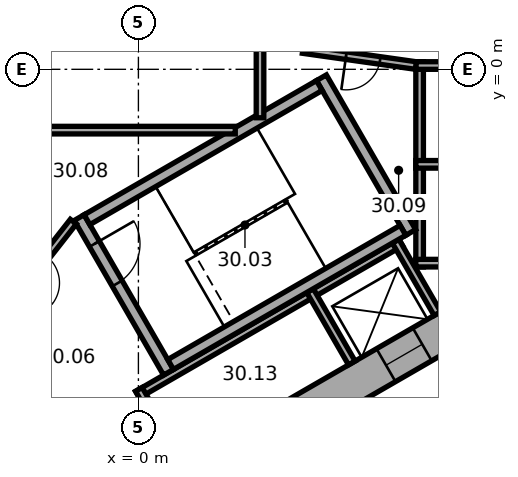
"""IFC4 building model, lengths in metres.
Left out: names, types, materials, properties, quantities, classifications, styles, units other than length and angle.
Written with IfcOpenShell. Run it as: python <this file> out.ifc"""

import sys

from ifc_helpers import new_model, si_unit, direction, frame, frame_2d, origin, place, context, subcontext, project, spatial, rectangle, extrude, element, fill, save


model = new_model("IFC4")
c1 = context("Model", 3, precision=1e-05, world=origin(), true_north=direction((0.0, 1.0)))
c2 = subcontext(c1, "Body", "Model", "MODEL_VIEW")
j1 = project(units=[si_unit("LENGTHUNIT", "METRE"), si_unit("PLANEANGLEUNIT", "RADIAN")], contexts=[c1])
p1 = place(None, origin())
s1 = spatial("IfcSite", under=j1, at=p1, CompositionType="ELEMENT")
p2 = place(p1, origin())
s2 = spatial("IfcBuilding", under=s1, at=p2, CompositionType="ELEMENT")
p3 = place(p2, frame((0.0, 0.0, 124.4)))
s3 = spatial("IfcBuildingStorey", under=s2, at=p3, CompositionType="ELEMENT", Elevation=124.4)
p4 = place(p3, frame((-10.25, -5.629, 0.0), z_axis=(0.0, 0.0, 1.0), x_axis=(0.866022616891, -0.50000482701, 0.0)))
e1 = element("IfcWall", 1, at=p4, inside=s3, PredefinedType="SHEAR", context=c2, shape_type="SweptSolid", body=[
    extrude(rectangle(XDim=12.125, YDim=1.0, at=frame_2d((6.062, 0.0))), origin(), (0.0, 0.0, 1.0), 3.7),
])
p5 = place(p4, frame((6.262, 0.0, 0.0)))
e2 = element("IfcOpeningElement", 2, at=p5, cuts=e1, PredefinedType="OPENING", context=c2, shape_type="SweptSolid", body=[
    extrude(rectangle(XDim=1.5, YDim=2.1, at=frame_2d((0.75, 1.05))), frame((0.0, 0.51, 0.0), z_axis=(0.0, -1.0, 0.0), x_axis=(1.0, 0.0, 0.0)), (0.0, 0.0, 1.0), 1.02),
])
p6 = place(p4, frame((1.812, 0.0, 0.0)))
e3 = element("IfcOpeningElement", 3, at=p6, cuts=e1, PredefinedType="OPENING", context=c2, shape_type="SweptSolid", body=[
    extrude(rectangle(XDim=0.9, YDim=2.1, at=frame_2d((0.45, 1.05))), frame((0.0, 0.51, 0.0), z_axis=(0.0, -1.0, 0.0), x_axis=(1.0, 0.0, 0.0)), (0.0, 0.0, 1.0), 1.02),
])
p7 = place(p4, frame((4.412, 0.0, 0.0)))
e4 = element("IfcOpeningElement", 4, at=p7, cuts=e1, PredefinedType="OPENING", context=c2, shape_type="SweptSolid", body=[
    extrude(rectangle(XDim=0.9, YDim=2.1, at=frame_2d((0.45, 1.05))), frame((0.0, 0.51, 0.0), z_axis=(0.0, -1.0, 0.0), x_axis=(1.0, 0.0, 0.0)), (0.0, 0.0, 1.0), 1.02),
])
p8 = place(p3, frame((-0.25, -11.691, 0.0), z_axis=(0.0, 0.0, 1.0), x_axis=(0.866022616891, 0.50000482701, 0.0)))
e5 = element("IfcWall", 5, at=p8, inside=s3, PredefinedType="SHEAR", context=c2, shape_type="SweptSolid", body=[
    extrude(rectangle(XDim=12.125, YDim=1.0, at=frame_2d((6.062, 0.0))), origin(), (0.0, 0.0, 1.0), 3.7),
])
p9 = place(p8, frame((4.012, 0.0, 0.0)))
e6 = element("IfcOpeningElement", 6, at=p9, cuts=e5, PredefinedType="OPENING", context=c2, shape_type="SweptSolid", body=[
    extrude(rectangle(XDim=0.9, YDim=2.1, at=frame_2d((0.45, 1.05))), frame((0.0, 0.51, 0.0), z_axis=(0.0, -1.0, 0.0), x_axis=(1.0, 0.0, 0.0)), (0.0, 0.0, 1.0), 1.02),
])
p10 = place(p8, frame((7.812, 0.0, 0.0)))
e7 = element("IfcOpeningElement", 7, at=p10, cuts=e5, PredefinedType="OPENING", context=c2, shape_type="SweptSolid", body=[
    extrude(rectangle(XDim=1.1, YDim=2.1, at=frame_2d((0.55, 1.05))), frame((0.0, 0.51, 0.0), z_axis=(0.0, -1.0, 0.0), x_axis=(1.0, 0.0, 0.0)), (0.0, 0.0, 1.0), 1.02),
])
p11 = place(p3, frame((7.4, -5.2, 0.0), z_axis=(0.0, 0.0, 1.0), x_axis=(0.0, 1.0, 0.0)))
e8 = element("IfcWall", 8, at=p11, inside=s3, PredefinedType="PARTITIONING", context=c2, shape_type="SweptSolid", body=[
    extrude(rectangle(XDim=5.4, YDim=0.2, at=frame_2d((2.7, 0.0))), origin(), (0.0, 0.0, 1.0), 3.42),
])
for number, where, z_axis, x_axis in (
    (9, (7.3, -5.1, 0.0), (0.0, 0.0, 1.0), (1.0, 0.0, 0.0)),
    (10, (7.3, -2.5, 0.0), (0.0, 0.0, 1.0), (1.0, 0.0, 0.0)),
    (11, (7.3, 0.1, 0.0), (0.0, 0.0, 1.0), (1.0, 0.0, 0.0)),
):
    element("IfcWall", number, at=place(p3, frame(where, z_axis=z_axis, x_axis=x_axis)), inside=s3, PredefinedType="PARTITIONING", context=c2, shape_type="SweptSolid", body=[
        extrude(rectangle(XDim=2.2, YDim=0.2, at=frame_2d((1.1, 0.0))), origin(), (0.0, 0.0, 1.0), 3.42),
    ])
p12 = place(p3, frame((-0.024, -8.559, 0.0), z_axis=(0.0, 0.0, 1.0), x_axis=(0.866026010844, 0.49999894854, 0.0)))
e12 = element("IfcWall", 12, at=p12, inside=s3, PredefinedType="PARTITIONING", context=c2, shape_type="SweptSolid", body=[
    extrude(rectangle(XDim=8.0, YDim=0.2, at=frame_2d((4.0, 0.0))), origin(), (0.0, 0.0, 1.0), 3.42),
])
for number, where, z_axis, x_axis in (
    (13, (0.013, -8.422, 0.0), (0.0, 0.0, 1.0), (0.5, -0.866, 0.0)),
    (14, (4.516, -5.822, 0.0), (0.0, 0.0, 1.0), (0.5, -0.866, 0.0)),
    (15, (6.768, -4.522, 0.0), (0.0, 0.0, 1.0), (0.5, -0.866, 0.0)),
):
    element("IfcWall", number, at=place(p3, frame(where, z_axis=z_axis, x_axis=x_axis)), inside=s3, PredefinedType="PARTITIONING", context=c2, shape_type="SweptSolid", body=[
        extrude(rectangle(XDim=2.2, YDim=0.2, at=frame_2d((1.1, 0.0))), origin(), (0.0, 0.0, 1.0), 3.42),
    ])
p13 = place(p3, frame((-1.558, -3.902, 0.0), z_axis=(0.0, 0.0, 1.0), x_axis=(0.499977259774, -0.866038532462, 0.0)))
e16 = element("IfcWall", 16, at=p13, inside=s3, PredefinedType="SHEAR", context=c2, shape_type="SweptSolid", body=[
    extrude(rectangle(XDim=4.7, YDim=0.3, at=frame_2d((2.35, 0.0))), origin(), (0.0, 0.0, 1.0), 3.42),
])
p14 = place(p13, frame((0.8, 0.0, 0.0)))
e17 = element("IfcOpeningElement", 17, at=p14, cuts=e16, PredefinedType="OPENING", context=c2, shape_type="SweptSolid", body=[
    extrude(rectangle(XDim=1.2, YDim=2.1, at=frame_2d((0.6, 1.05))), frame((0.0, 0.16, 0.0), z_axis=(0.0, -1.0, 0.0), x_axis=(1.0, 0.0, 0.0)), (0.0, 0.0, 1.0), 0.32),
])
p15 = place(p3, frame((4.816, -0.222, 0.0), z_axis=(0.0, 0.0, 1.0), x_axis=(0.499977259774, -0.866038532462, 0.0)))
e18 = element("IfcWall", 18, at=p15, inside=s3, PredefinedType="SHEAR", context=c2, shape_type="SweptSolid", body=[
    extrude(rectangle(XDim=4.7, YDim=0.3, at=frame_2d((2.35, 0.0))), origin(), (0.0, 0.0, 1.0), 3.42),
])
for number, where, z_axis, x_axis in (
    (19, (-1.353, -3.957, 0.0), (0.0, 0.0, 1.0), (0.866, 0.5, 0.0)),
    (20, (0.847, -7.767, 0.0), (0.0, 0.0, 1.0), (0.866, 0.5, 0.0)),
):
    element("IfcWall", number, at=place(p3, frame(where, z_axis=z_axis, x_axis=x_axis)), inside=s3, PredefinedType="SHEAR", context=c2, shape_type="SweptSolid", body=[
        extrude(rectangle(XDim=7.06, YDim=0.3, at=frame_2d((3.53, 0.0))), origin(), (0.0, 0.0, 1.0), 3.42),
    ])
p16 = place(p3, frame((4.327, 0.521, 0.0), z_axis=(0.0, 0.0, 1.0), x_axis=(0.990124376366, -0.14019172346, 0.0)))
e21 = element("IfcWall", 21, at=p16, inside=s3, PredefinedType="PARTITIONING", context=c2, shape_type="SweptSolid", body=[
    extrude(rectangle(XDim=3.002, YDim=0.2, at=frame_2d((1.501, 0.0))), origin(), (0.0, 0.0, 1.0), 3.42),
])
p17 = place(p16, frame((1.15, 0.0, 0.0)))
e22 = element("IfcOpeningElement", 22, at=p17, cuts=e21, PredefinedType="OPENING", context=c2, shape_type="SweptSolid", body=[
    extrude(rectangle(XDim=0.9, YDim=2.1, at=frame_2d((0.45, 1.05))), frame((0.0, 0.11, 0.0), z_axis=(0.0, -1.0, 0.0), x_axis=(1.0, 0.0, 0.0)), (0.0, 0.0, 1.0), 0.22),
])
p18 = place(p3, frame((-1.712, -4.008, 0.0), z_axis=(0.0, 0.0, 1.0), x_axis=(-0.616549420702, -0.787316208287, 0.0)))
e23 = element("IfcWall", 23, at=p18, inside=s3, PredefinedType="PARTITIONING", context=c2, shape_type="SweptSolid", body=[
    extrude(rectangle(XDim=3.002, YDim=0.2, at=frame_2d((1.501, 0.0))), origin(), (0.0, 0.0, 1.0), 3.42),
])
p19 = place(p18, frame((1.15, 0.0, 0.0)))
e24 = element("IfcOpeningElement", 24, at=p19, cuts=e23, PredefinedType="OPENING", context=c2, shape_type="SweptSolid", body=[
    extrude(rectangle(XDim=0.9, YDim=2.1, at=frame_2d((0.45, 1.05))), frame((0.0, 0.11, 0.0), z_axis=(0.0, -1.0, 0.0), x_axis=(1.0, 0.0, 0.0)), (0.0, 0.0, 1.0), 0.22),
])
p20 = place(p3, frame((-2.72, -1.6, 0.0), z_axis=(0.0, 0.0, 1.0), x_axis=(1.0, 0.0, 0.0)))
e25 = element("IfcWall", 25, at=p20, inside=s3, PredefinedType="PARTITIONING", context=c2, shape_type="SweptSolid", body=[
    extrude(rectangle(XDim=5.269, YDim=0.2, at=frame_2d((2.634, 0.0))), origin(), (0.0, 0.0, 1.0), 3.42),
])
p21 = place(p3, frame((3.2, -1.275, 0.0), z_axis=(0.0, 0.0, 1.0), x_axis=(0.0, 1.0, 0.0)))
e26 = element("IfcWall", 26, at=p21, inside=s3, PredefinedType="PARTITIONING", context=c2, shape_type="SweptSolid", body=[
    extrude(rectangle(XDim=2.549, YDim=0.2, at=frame_2d((1.275, 0.0))), origin(), (0.0, 0.0, 1.0), 3.42),
])
p22 = place(p3, frame((-11.415, -7.728, 0.0), z_axis=(0.0, 0.0, 1.0), x_axis=(0.866022749921, -0.500004596598, 0.0)))
e27 = element("IfcWall", 27, at=p22, inside=s3, PredefinedType="PARTITIONING", context=c2, shape_type="SweptSolid", body=[
    extrude(rectangle(XDim=12.084, YDim=0.2, at=frame_2d((6.042, 0.0))), origin(), (0.0, 0.0, 1.0), 3.42),
])
p23 = place(p22, frame((2.652, 0.0, 0.0)))
e28 = element("IfcOpeningElement", 28, at=p23, cuts=e27, PredefinedType="OPENING", context=c2, shape_type="SweptSolid", body=[
    extrude(rectangle(XDim=1.0, YDim=2.1, at=frame_2d((0.5, 1.05))), frame((0.0, 0.11, 0.0), z_axis=(0.0, -1.0, 0.0), x_axis=(1.0, 0.0, 0.0)), (0.0, 0.0, 1.0), 0.22),
])
p24 = place(p22, frame((6.406, 0.0, 0.0)))
e29 = element("IfcOpeningElement", 29, at=p24, cuts=e27, PredefinedType="OPENING", context=c2, shape_type="SweptSolid", body=[
    extrude(rectangle(XDim=1.0, YDim=2.1, at=frame_2d((0.5, 1.05))), frame((0.0, 0.11, 0.0), z_axis=(0.0, -1.0, 0.0), x_axis=(1.0, 0.0, 0.0)), (0.0, 0.0, 1.0), 0.22),
])
p25 = place(p22, frame((9.934, 0.0, 0.0)))
e30 = element("IfcOpeningElement", 30, at=p25, cuts=e27, PredefinedType="OPENING", context=c2, shape_type="SweptSolid", body=[
    extrude(rectangle(XDim=1.0, YDim=2.1, at=frame_2d((0.5, 1.05))), frame((0.0, 0.11, 0.0), z_axis=(0.0, -1.0, 0.0), x_axis=(1.0, 0.0, 0.0)), (0.0, 0.0, 1.0), 0.22),
])
p26 = place(p14, origin())
e31 = element("IfcDoor", 31, at=p26, inside=s3, OperationType="SINGLE_SWING_RIGHT", PredefinedType="DOOR", context=c2, shape_type="SweptSolid", body=[
    extrude(rectangle(XDim=1.2, YDim=2.1, at=frame_2d((0.6, 1.05))), frame((0.0, 0.025, 0.0), z_axis=(0.0, -1.0, 0.0), x_axis=(1.0, 0.0, 0.0)), (0.0, 0.0, 1.0), 0.05),
])
fill(e17, e31)
p27 = place(p17, origin())
e32 = element("IfcDoor", 32, at=p27, inside=s3, OperationType="SINGLE_SWING_LEFT", PredefinedType="DOOR", context=c2, shape_type="SweptSolid", body=[
    extrude(rectangle(XDim=0.9, YDim=2.1, at=frame_2d((0.45, 1.05))), frame((0.0, 0.025, 0.0), z_axis=(0.0, -1.0, 0.0), x_axis=(1.0, 0.0, 0.0)), (0.0, 0.0, 1.0), 0.05),
])
fill(e22, e32)
p28 = place(p10, origin())
e33 = element("IfcDoor", 33, at=p28, inside=s3, OperationType="DOUBLE_DOOR_SLIDING", PredefinedType="DOOR", context=c2, shape_type="SweptSolid", body=[
    extrude(rectangle(XDim=1.1, YDim=2.1, at=frame_2d((0.55, 1.05))), frame((0.0, 0.025, 0.0), z_axis=(0.0, -1.0, 0.0), x_axis=(1.0, 0.0, 0.0)), (0.0, 0.0, 1.0), 0.05),
])
fill(e7, e33)
save(model, sys.argv[1])
